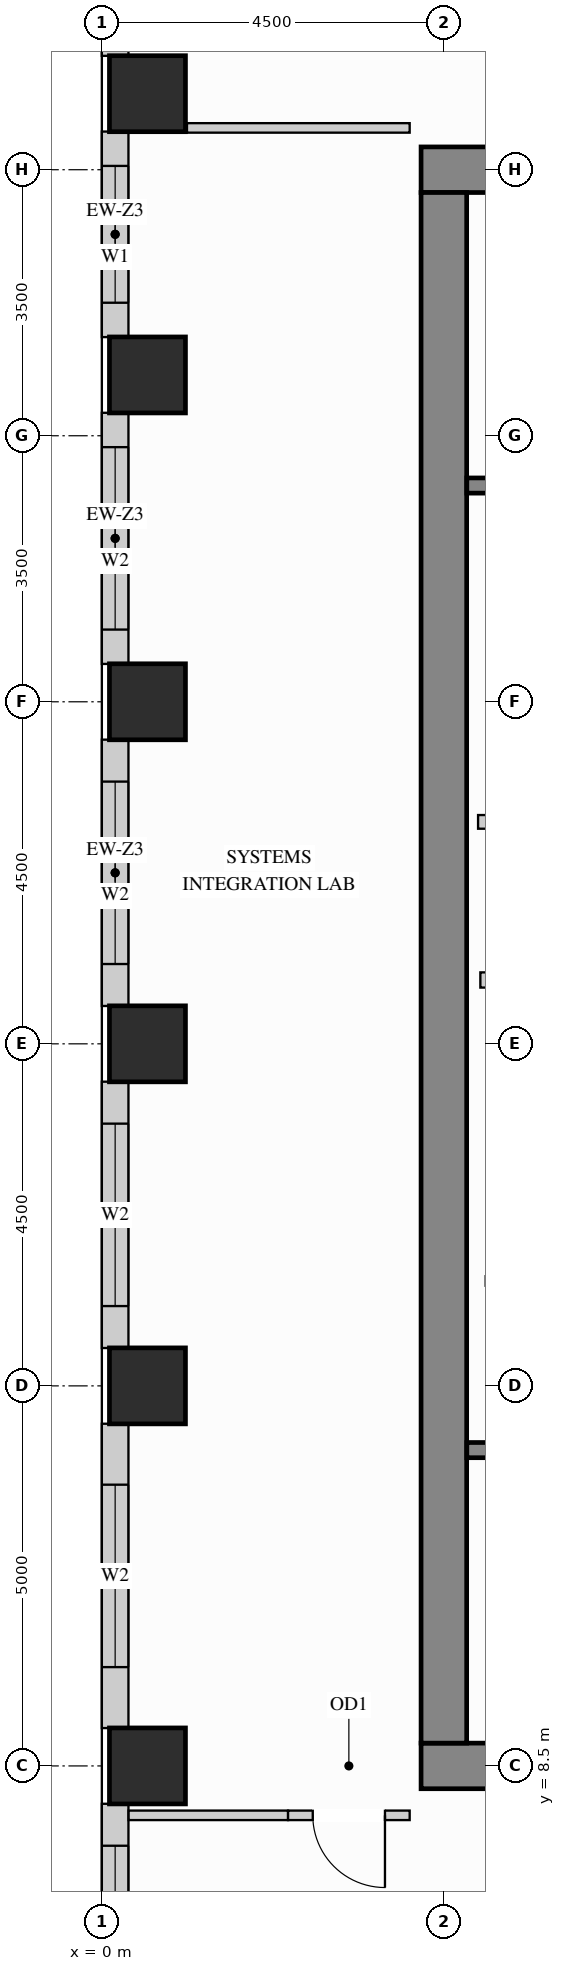
"""IFC4 building model, lengths in metres.
Left out: names, types, materials, properties, quantities, classifications, styles, units other than length and angle.
Written with IfcOpenShell. Run it as: python <this file> out.ifc"""

import sys

from ifc_helpers import new_model, si_unit, direction, frame, frame_2d, origin, origin_2d, place, context, subcontext, project, spatial, rectangle, extrude, source, transform, mapped, element, fill, save


model = new_model("IFC4")
c1 = context("Model", 3, precision=1e-05, world=origin(), true_north=direction((0.0, 1.0)))
c2 = subcontext(c1, "Body", "Model", "MODEL_VIEW")
j1 = project(units=[si_unit("LENGTHUNIT", "METRE"), si_unit("PLANEANGLEUNIT", "RADIAN")], contexts=[c1])
p1 = place(None, origin())
s1 = spatial("IfcSite", under=j1, at=p1, CompositionType="ELEMENT")
p2 = place(p1, origin())
s2 = spatial("IfcBuilding", under=s1, at=p2, CompositionType="ELEMENT")
p3 = place(p2, frame((0.0, 0.0, 168.3)))
s3 = spatial("IfcBuildingStorey", under=s2, at=p3, CompositionType="ELEMENT", Elevation=168.3)
m1 = source(origin(), c2, "Body", "SweptSolid", [
    extrude(rectangle(XDim=1.0, YDim=1.0, at=origin_2d()), origin(), (0.0, 0.0, 1.0), 3.4),
])
for number, where, z_axis, x_axis in (
    (1, (0.6, 13.5, 0.0), (0.0, 0.0, 1.0), (1.0, 0.0, 0.0)),
    (2, (0.6, 18.0, 0.0), (0.0, 0.0, 1.0), (1.0, 0.0, 0.0)),
    (3, (0.6, 22.5, 0.0), (0.0, 0.0, 1.0), (1.0, 0.0, 0.0)),
    (4, (0.6, 26.8, 0.0), (0.0, 0.0, 1.0), (1.0, 0.0, 0.0)),
    (5, (0.6, 30.5, 0.0), (0.0, 0.0, 1.0), (1.0, 0.0, 0.0)),
    (6, (0.6, 8.5, 0.0), (0.0, 0.0, 1.0), (1.0, 0.0, 0.0)),
):
    element("IfcColumn", number, at=place(p3, frame(where, z_axis=z_axis, x_axis=x_axis)), inside=s3, PredefinedType="COLUMN", context=c2, shape_type="MappedRepresentation", body=[
        mapped(m1, transform((0.0, 0.0, 0.0), x_axis=(1.0, 0.0, 0.0), y_axis=(0.0, 1.0, 0.0), z_axis=(0.0, 0.0, 1.0))),
    ])
m2 = source(origin(), c2, "Body", "SweptSolid", [
    extrude(rectangle(XDim=10.6, YDim=0.6, at=frame_2d((5.3, 0.0))), origin(), (0.0, 0.0, 1.0), 3.4),
])
for number, where, z_axis, x_axis in (
    (7, (4.2, 29.5, 0.0), (0.0, 0.0, 1.0), (1.0, 0.0, 0.0)),
    (8, (4.2, 8.5, 0.0), (0.0, 0.0, 1.0), (1.0, 0.0, 0.0)),
):
    element("IfcWall", number, at=place(p3, frame(where, z_axis=z_axis, x_axis=x_axis)), inside=s3, PredefinedType="SHEAR", context=c2, shape_type="MappedRepresentation", body=[
        mapped(m2, transform((0.0, 0.0, 0.0), x_axis=(1.0, 0.0, 0.0), y_axis=(0.0, 1.0, 0.0), z_axis=(0.0, 0.0, 1.0))),
    ])
m3 = source(origin(), c2, "Body", "SweptSolid", [
    extrude(rectangle(XDim=20.4, YDim=0.6, at=frame_2d((10.2, 0.0))), origin(), (0.0, 0.0, 1.0), 3.4),
])
p4 = place(p3, frame((4.5, 8.8, 0.0), z_axis=(0.0, 0.0, 1.0), x_axis=(0.0, 1.0, 0.0)))
e9 = element("IfcWall", 9, at=p4, inside=s3, PredefinedType="SHEAR", context=c2, shape_type="MappedRepresentation", body=[
    mapped(m3, transform((0.0, 0.0, 0.0), x_axis=(1.0, 0.0, 0.0), y_axis=(0.0, 1.0, 0.0), z_axis=(0.0, 0.0, 1.0))),
])
p5 = place(p3, frame((0.175, 34.502, 0.0), z_axis=(0.0, 0.0, 1.0), x_axis=(0.0, -1.0, 0.0)))
e10 = element("IfcWall", 10, at=p5, inside=s3, PredefinedType="SOLIDWALL", context=c2, shape_type="SweptSolid", body=[
    extrude(rectangle(XDim=3.504, YDim=0.35, at=frame_2d((1.752, 0.0))), origin(), (0.0, 0.0, 1.0), 2.612),
])
p6 = place(p5, frame((0.561, 0.0, 0.78)))
e11 = element("IfcOpeningElement", 11, at=p6, cuts=e10, PredefinedType="OPENING", context=c2, shape_type="SweptSolid", body=[
    extrude(rectangle(XDim=1.8, YDim=1.652, at=frame_2d((0.9, 0.826))), frame((0.0, 0.185, 0.0), z_axis=(0.0, -1.0, 0.0), x_axis=(1.0, 0.0, 0.0)), (0.0, 0.0, 1.0), 0.37),
])
p7 = place(p3, frame((0.175, 30.002, 0.0), z_axis=(0.0, 0.0, 1.0), x_axis=(0.0, -1.0, 0.0)))
e12 = element("IfcWall", 12, at=p7, inside=s3, PredefinedType="SOLIDWALL", context=c2, shape_type="SweptSolid", body=[
    extrude(rectangle(XDim=2.704, YDim=0.35, at=frame_2d((1.352, 0.0))), origin(), (0.0, 0.0, 1.0), 2.612),
])
p8 = place(p7, frame((0.452, 0.0, 0.78)))
e13 = element("IfcOpeningElement", 13, at=p8, cuts=e12, PredefinedType="OPENING", context=c2, shape_type="SweptSolid", body=[
    extrude(rectangle(XDim=1.8, YDim=1.652, at=frame_2d((0.9, 0.826))), frame((0.0, 0.185, 0.0), z_axis=(0.0, -1.0, 0.0), x_axis=(1.0, 0.0, 0.0)), (0.0, 0.0, 1.0), 0.37),
])
p9 = place(p3, frame((0.175, 26.302, 0.0), z_axis=(0.0, 0.0, 1.0), x_axis=(0.0, -1.0, 0.0)))
e14 = element("IfcWall", 14, at=p9, inside=s3, PredefinedType="SOLIDWALL", context=c2, shape_type="SweptSolid", body=[
    extrude(rectangle(XDim=3.304, YDim=0.35, at=frame_2d((1.652, 0.0))), origin(), (0.0, 0.0, 1.0), 2.612),
])
p10 = place(p9, frame((0.452, 0.0, 0.78)))
e15 = element("IfcOpeningElement", 15, at=p10, cuts=e14, PredefinedType="OPENING", context=c2, shape_type="SweptSolid", body=[
    extrude(rectangle(XDim=2.4, YDim=1.652, at=frame_2d((1.2, 0.826))), frame((0.0, 0.185, 0.0), z_axis=(0.0, -1.0, 0.0), x_axis=(1.0, 0.0, 0.0)), (0.0, 0.0, 1.0), 0.37),
])
p11 = place(p3, frame((0.175, 22.002, 0.0), z_axis=(0.0, 0.0, 1.0), x_axis=(0.0, -1.0, 0.0)))
e16 = element("IfcWall", 16, at=p11, inside=s3, PredefinedType="SOLIDWALL", context=c2, shape_type="SweptSolid", body=[
    extrude(rectangle(XDim=3.504, YDim=0.35, at=frame_2d((1.752, 0.0))), origin(), (0.0, 0.0, 1.0), 2.612),
])
p12 = place(p11, frame((0.552, 0.0, 0.78)))
e17 = element("IfcOpeningElement", 17, at=p12, cuts=e16, PredefinedType="OPENING", context=c2, shape_type="SweptSolid", body=[
    extrude(rectangle(XDim=2.4, YDim=1.652, at=frame_2d((1.2, 0.826))), frame((0.0, 0.185, 0.0), z_axis=(0.0, -1.0, 0.0), x_axis=(1.0, 0.0, 0.0)), (0.0, 0.0, 1.0), 0.37),
])
p13 = place(p3, frame((0.175, 17.502, 0.0), z_axis=(0.0, 0.0, 1.0), x_axis=(0.0, -1.0, 0.0)))
e18 = element("IfcWall", 18, at=p13, inside=s3, PredefinedType="SOLIDWALL", context=c2, shape_type="SweptSolid", body=[
    extrude(rectangle(XDim=3.504, YDim=0.35, at=frame_2d((1.752, 0.0))), origin(), (0.0, 0.0, 1.0), 2.612),
])
p14 = place(p13, frame((0.552, 0.0, 0.78)))
e19 = element("IfcOpeningElement", 19, at=p14, cuts=e18, PredefinedType="OPENING", context=c2, shape_type="SweptSolid", body=[
    extrude(rectangle(XDim=2.4, YDim=1.652, at=frame_2d((1.2, 0.826))), frame((0.0, 0.185, 0.0), z_axis=(0.0, -1.0, 0.0), x_axis=(1.0, 0.0, 0.0)), (0.0, 0.0, 1.0), 0.37),
])
p15 = place(p3, frame((0.175, 13.002, 0.0), z_axis=(0.0, 0.0, 1.0), x_axis=(0.0, -1.0, 0.0)))
e20 = element("IfcWall", 20, at=p15, inside=s3, PredefinedType="SOLIDWALL", context=c2, shape_type="SweptSolid", body=[
    extrude(rectangle(XDim=4.004, YDim=0.35, at=frame_2d((2.002, 0.0))), origin(), (0.0, 0.0, 1.0), 2.612),
])
p16 = place(p15, frame((0.802, 0.0, 0.78)))
e21 = element("IfcOpeningElement", 21, at=p16, cuts=e20, PredefinedType="OPENING", context=c2, shape_type="SweptSolid", body=[
    extrude(rectangle(XDim=2.4, YDim=1.652, at=frame_2d((1.2, 0.826))), frame((0.0, 0.185, 0.0), z_axis=(0.0, -1.0, 0.0), x_axis=(1.0, 0.0, 0.0)), (0.0, 0.0, 1.0), 0.37),
])
p17 = place(p3, frame((0.175, 8.002, 0.0), z_axis=(0.0, 0.0, 1.0), x_axis=(0.0, -1.0, 0.0)))
e22 = element("IfcWall", 22, at=p17, inside=s3, PredefinedType="SOLIDWALL", context=c2, shape_type="SweptSolid", body=[
    extrude(rectangle(XDim=4.004, YDim=0.35, at=frame_2d((2.002, 0.0))), origin(), (0.0, 0.0, 1.0), 2.612),
])
p18 = place(p17, frame((0.552, 0.0, 0.78)))
e23 = element("IfcOpeningElement", 23, at=p18, cuts=e22, PredefinedType="OPENING", context=c2, shape_type="SweptSolid", body=[
    extrude(rectangle(XDim=2.4, YDim=1.652, at=frame_2d((1.2, 0.826))), frame((0.0, 0.185, 0.0), z_axis=(0.0, -1.0, 0.0), x_axis=(1.0, 0.0, 0.0)), (0.0, 0.0, 1.0), 0.37),
])
m4 = source(origin(), c2, "Body", "SweptSolid", [
    extrude(rectangle(XDim=2.2, YDim=0.18, at=frame_2d((1.1, 0.0))), origin(), (0.0, 0.0, 1.0), 3.385),
])
p19 = place(p3, frame((4.95, 20.92, 0.0), z_axis=(0.0, 0.0, 1.0), x_axis=(1.0, 0.0, 0.0)))
e24 = element("IfcWall", 24, at=p19, inside=s3, PredefinedType="PARTITIONING", context=c2, shape_type="MappedRepresentation", body=[
    mapped(m4, transform((0.0, 0.0, 0.0), x_axis=(1.0, 0.0, 0.0), y_axis=(0.0, 1.0, 0.0), z_axis=(0.0, 0.0, 1.0))),
])
p20 = place(p3, frame((5.05, 14.88, 0.0), z_axis=(0.0, 0.0, 1.0), x_axis=(1.0, 0.0, 0.0)))
e25 = element("IfcWall", 25, at=p20, inside=s3, PredefinedType="PARTITIONING", context=c2, shape_type="SweptSolid", body=[
    extrude(rectangle(XDim=2.35, YDim=0.125, at=frame_2d((1.175, 0.0))), origin(), (0.0, 0.0, 1.0), 3.385),
])
p21 = place(p20, frame((0.7, 0.0, 0.0)))
e26 = element("IfcOpeningElement", 26, at=p21, cuts=e25, PredefinedType="OPENING", context=c2, shape_type="SweptSolid", body=[
    extrude(rectangle(XDim=0.85, YDim=2.1, at=frame_2d((0.425, 1.05))), frame((0.0, 0.073, 0.0), z_axis=(0.0, -1.0, 0.0), x_axis=(1.0, 0.0, 0.0)), (0.0, 0.0, 1.0), 0.145),
])
m5 = source(origin(), c2, "Body", "SweptSolid", [
    extrude(rectangle(XDim=2.93, YDim=0.125, at=frame_2d((1.465, 0.0))), origin(), (0.0, 0.0, 1.0), 3.385),
])
p22 = place(p3, frame((1.12, 30.05, 0.0), z_axis=(0.0, 0.0, 1.0), x_axis=(1.0, 0.0, 0.0)))
e27 = element("IfcWall", 27, at=p22, inside=s3, PredefinedType="PARTITIONING", context=c2, shape_type="MappedRepresentation", body=[
    mapped(m5, transform((0.0, 0.0, 0.0), x_axis=(1.0, 0.0, 0.0), y_axis=(0.0, 1.0, 0.0), z_axis=(0.0, 0.0, 1.0))),
])
m6 = source(origin(), c2, "Body", "SweptSolid", [
    extrude(rectangle(XDim=2.098, YDim=0.125, at=frame_2d((1.049, 0.0))), origin(), (0.0, 0.0, 1.0), 3.385),
])
p23 = place(p3, frame((0.352, 7.85, 0.0), z_axis=(0.0, 0.0, 1.0), x_axis=(1.0, 0.0, 0.0)))
e28 = element("IfcWall", 28, at=p23, inside=s3, PredefinedType="PARTITIONING", context=c2, shape_type="MappedRepresentation", body=[
    mapped(m6, transform((0.0, 0.0, 0.0), x_axis=(1.0, 0.0, 0.0), y_axis=(0.0, 1.0, 0.0), z_axis=(0.0, 0.0, 1.0))),
])
p24 = place(p3, frame((2.45, 7.85, 0.0), z_axis=(0.0, 0.0, 1.0), x_axis=(1.0, 0.0, 0.0)))
e29 = element("IfcWall", 29, at=p24, inside=s3, PredefinedType="PARTITIONING", context=c2, shape_type="SweptSolid", body=[
    extrude(rectangle(XDim=1.6, YDim=0.125, at=frame_2d((0.8, 0.0))), origin(), (0.0, 0.0, 1.0), 3.385),
])
p25 = place(p24, frame((0.325, 0.0, 0.0)))
e30 = element("IfcOpeningElement", 30, at=p25, cuts=e29, PredefinedType="OPENING", context=c2, shape_type="SweptSolid", body=[
    extrude(rectangle(XDim=0.95, YDim=2.15, at=frame_2d((0.475, 1.075))), frame((0.0, 0.073, 0.0), z_axis=(0.0, -1.0, 0.0), x_axis=(1.0, 0.0, 0.0)), (0.0, 0.0, 1.0), 0.145),
])
m7 = source(origin(), c2, "Body", "SweptSolid", [
    extrude(rectangle(XDim=2.09, YDim=0.2, at=frame_2d((1.045, 0.0))), origin(), (0.0, 0.0, 1.0), 3.385),
])
p26 = place(p3, frame((4.98, 18.84, 0.0), z_axis=(0.0, 0.0, 1.0), x_axis=(1.0, 0.0, 0.0)))
e31 = element("IfcWall", 31, at=p26, inside=s3, PredefinedType="PARTITIONING", context=c2, shape_type="MappedRepresentation", body=[
    mapped(m7, transform((0.0, 0.0, 0.0), x_axis=(1.0, 0.0, 0.0), y_axis=(0.0, 1.0, 0.0), z_axis=(0.0, 0.0, 1.0))),
])
p27 = place(p3, frame((4.802, 12.655, 0.0), z_axis=(0.0, 0.0, 1.0), x_axis=(1.0, 0.0, 0.0)))
e32 = element("IfcWall", 32, at=p27, inside=s3, PredefinedType="SHEAR", context=c2, shape_type="SweptSolid", body=[
    extrude(rectangle(XDim=7.603, YDim=0.2, at=frame_2d((3.802, 0.0))), origin(), (0.0, 0.0, 1.0), 3.4),
])
p28 = place(p27, frame((0.4, 0.0, 0.0)))
e33 = element("IfcOpeningElement", 33, at=p28, cuts=e32, PredefinedType="OPENING", context=c2, shape_type="SweptSolid", body=[
    extrude(rectangle(XDim=1.1, YDim=2.15, at=frame_2d((0.55, 1.075))), frame((0.0, 0.11, 0.0), z_axis=(0.0, -1.0, 0.0), x_axis=(1.0, 0.0, 0.0)), (0.0, 0.0, 1.0), 0.22),
])
p29 = place(p3, frame((4.802, 25.345, 0.0), z_axis=(0.0, 0.0, 1.0), x_axis=(1.0, 0.0, 0.0)))
e34 = element("IfcWall", 34, at=p29, inside=s3, PredefinedType="SHEAR", context=c2, shape_type="SweptSolid", body=[
    extrude(rectangle(XDim=7.603, YDim=0.2, at=frame_2d((3.802, 0.0))), origin(), (0.0, 0.0, 1.0), 3.4),
])
p30 = place(p29, frame((0.4, 0.0, 0.0)))
e35 = element("IfcOpeningElement", 35, at=p30, cuts=e34, PredefinedType="OPENING", context=c2, shape_type="SweptSolid", body=[
    extrude(rectangle(XDim=1.1, YDim=2.15, at=frame_2d((0.55, 1.075))), frame((0.0, 0.11, 0.0), z_axis=(0.0, -1.0, 0.0), x_axis=(1.0, 0.0, 0.0)), (0.0, 0.0, 1.0), 0.22),
])
m8 = source(origin(), c2, "Body", "SweptSolid", [
    extrude(rectangle(XDim=0.95, YDim=2.15, at=frame_2d((0.475, 1.075))), frame((0.0, 0.025, 0.0), z_axis=(0.0, -1.0, 0.0), x_axis=(1.0, 0.0, 0.0)), (0.0, 0.0, 1.0), 0.05),
])
p31 = place(p25, origin())
e36 = element("IfcDoor", 36, at=p31, inside=s3, OperationType="SINGLE_SWING_RIGHT", PredefinedType="DOOR", context=c2, shape_type="MappedRepresentation", body=[
    mapped(m8, transform((0.0, 0.0, 0.0), x_axis=(1.0, 0.0, 0.0), y_axis=(0.0, 1.0, 0.0), z_axis=(0.0, 0.0, 1.0))),
])
fill(e30, e36)
m9 = source(origin(), c2, "Body", "SweptSolid", [
    extrude(rectangle(XDim=1.8, YDim=1.652, at=frame_2d((0.9, 0.826))), frame((0.0, 0.03, 0.0), z_axis=(0.0, -1.0, 0.0), x_axis=(1.0, 0.0, 0.0)), (0.0, 0.0, 1.0), 0.06),
])
p32 = place(p8, origin())
e37 = element("IfcWindow", 37, at=p32, inside=s3, PartitioningType="SINGLE_PANEL", PredefinedType="WINDOW", context=c2, shape_type="MappedRepresentation", body=[
    mapped(m9, transform((0.0, 0.0, 0.0), x_axis=(1.0, 0.0, 0.0), y_axis=(0.0, 1.0, 0.0), z_axis=(0.0, 0.0, 1.0))),
])
fill(e13, e37)
m10 = source(origin(), c2, "Body", "SweptSolid", [
    extrude(rectangle(XDim=2.4, YDim=1.652, at=frame_2d((1.2, 0.826))), frame((0.0, 0.03, 0.0), z_axis=(0.0, -1.0, 0.0), x_axis=(1.0, 0.0, 0.0)), (0.0, 0.0, 1.0), 0.06),
])
p33 = place(p10, origin())
e38 = element("IfcWindow", 38, at=p33, inside=s3, PartitioningType="SINGLE_PANEL", PredefinedType="WINDOW", context=c2, shape_type="MappedRepresentation", body=[
    mapped(m10, transform((0.0, 0.0, 0.0), x_axis=(1.0, 0.0, 0.0), y_axis=(0.0, 1.0, 0.0), z_axis=(0.0, 0.0, 1.0))),
])
fill(e15, e38)
p34 = place(p12, origin())
e39 = element("IfcWindow", 39, at=p34, inside=s3, PartitioningType="SINGLE_PANEL", PredefinedType="WINDOW", context=c2, shape_type="MappedRepresentation", body=[
    mapped(m10, transform((0.0, 0.0, 0.0), x_axis=(1.0, 0.0, 0.0), y_axis=(0.0, 1.0, 0.0), z_axis=(0.0, 0.0, 1.0))),
])
fill(e17, e39)
p35 = place(p14, origin())
e40 = element("IfcWindow", 40, at=p35, inside=s3, PartitioningType="SINGLE_PANEL", PredefinedType="WINDOW", context=c2, shape_type="MappedRepresentation", body=[
    mapped(m10, transform((0.0, 0.0, 0.0), x_axis=(1.0, 0.0, 0.0), y_axis=(0.0, 1.0, 0.0), z_axis=(0.0, 0.0, 1.0))),
])
fill(e19, e40)
p36 = place(p16, origin())
e41 = element("IfcWindow", 41, at=p36, inside=s3, PartitioningType="SINGLE_PANEL", PredefinedType="WINDOW", context=c2, shape_type="MappedRepresentation", body=[
    mapped(m10, transform((0.0, 0.0, 0.0), x_axis=(1.0, 0.0, 0.0), y_axis=(0.0, 1.0, 0.0), z_axis=(0.0, 0.0, 1.0))),
])
fill(e21, e41)
p37 = place(p18, origin())
e42 = element("IfcWindow", 42, at=p37, inside=s3, PartitioningType="SINGLE_PANEL", PredefinedType="WINDOW", context=c2, shape_type="MappedRepresentation", body=[
    mapped(m10, transform((0.0, 0.0, 0.0), x_axis=(1.0, 0.0, 0.0), y_axis=(0.0, 1.0, 0.0), z_axis=(0.0, 0.0, 1.0))),
])
fill(e23, e42)
save(model, sys.argv[1])
